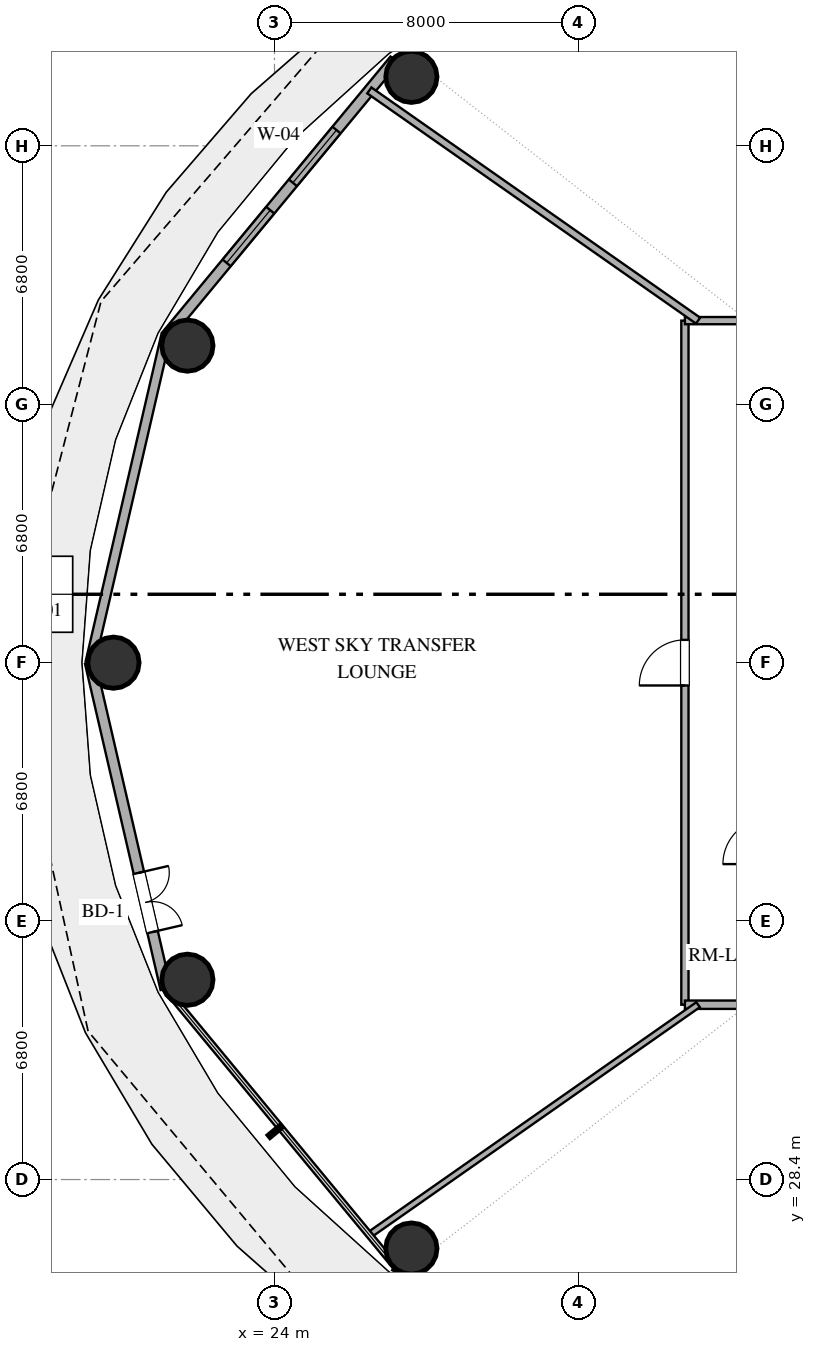
"""IFC4 building model, lengths in metres.
Left out: names, types, materials, properties, quantities, classifications, styles, units other than length and angle.
Written with IfcOpenShell. Run it as: python <this file> out.ifc"""

import sys

from ifc_helpers import new_model, si_unit, direction, frame, frame_2d, origin, origin_2d, place, context, subcontext, project, spatial, rectangle, hollow_circle, extrude, element, fill, save


model = new_model("IFC4")
c1 = context("Model", 3, precision=1e-05, world=origin(), true_north=direction((0.0, 1.0)))
c2 = subcontext(c1, "Body", "Model", "MODEL_VIEW")
j1 = project(units=[si_unit("LENGTHUNIT", "METRE"), si_unit("PLANEANGLEUNIT", "RADIAN")], contexts=[c1])
p1 = place(None, origin())
s1 = spatial("IfcSite", under=j1, at=p1, CompositionType="ELEMENT")
p2 = place(p1, origin())
s2 = spatial("IfcBuilding", under=s1, at=p2, CompositionType="ELEMENT")
p3 = place(p2, frame((0.0, 0.0, 134.4)))
s3 = spatial("IfcBuildingStorey", under=s2, at=p3, CompositionType="ELEMENT", Elevation=134.4)
for number, where, z_axis, x_axis in (
    (1, (27.602, 57.415, 0.0), (0.0, 0.0, 1.0), (1.0, 0.0, 0.0)),
    (2, (21.709, 50.343, 0.0), (0.0, 0.0, 1.0), (1.0, 0.0, 0.0)),
    (3, (19.763, 42.0, 0.0), (0.0, 0.0, 1.0), (1.0, 0.0, 0.0)),
    (4, (21.709, 33.657, 0.0), (0.0, 0.0, 1.0), (1.0, 0.0, 0.0)),
    (5, (27.602, 26.585, 0.0), (0.0, 0.0, 1.0), (1.0, 0.0, 0.0)),
):
    element("IfcColumn", number, at=place(p3, frame(where, z_axis=z_axis, x_axis=x_axis)), inside=s3, PredefinedType="COLUMN", context=c2, shape_type="SweptSolid", body=[
        extrude(hollow_circle(Radius=0.675, WallThickness=0.036, at=origin_2d()), origin(), (0.0, 0.0, 1.0), 5.05),
    ])
p4 = place(p3, frame((27.16, 57.86, 0.0), z_axis=(0.0, 0.0, 1.0), x_axis=(-0.637505817448, -0.770445541696, 0.0)))
e6 = element("IfcWall", 6, at=p4, inside=s3, PredefinedType="SOLIDWALL", context=c2, shape_type="SweptSolid", body=[
    extrude(rectangle(XDim=9.445, YDim=0.28, at=frame_2d((4.723, 0.0))), origin(), (0.0, 0.0, 1.0), 5.05),
])
p5 = place(p4, frame((2.396, 0.0, 0.85)))
e7 = element("IfcOpeningElement", 7, at=p5, cuts=e6, PredefinedType="OPENING", context=c2, shape_type="SweptSolid", body=[
    extrude(rectangle(XDim=1.8, YDim=2.2, at=frame_2d((0.9, 1.1))), frame((0.0, 0.15, 0.0), z_axis=(0.0, -1.0, 0.0), x_axis=(1.0, 0.0, 0.0)), (0.0, 0.0, 1.0), 0.3),
])
p6 = place(p4, frame((5.132, 0.0, 0.85)))
e8 = element("IfcOpeningElement", 8, at=p6, cuts=e6, PredefinedType="OPENING", context=c2, shape_type="SweptSolid", body=[
    extrude(rectangle(XDim=1.8, YDim=2.2, at=frame_2d((0.9, 1.1))), frame((0.0, 0.15, 0.0), z_axis=(0.0, -1.0, 0.0), x_axis=(1.0, 0.0, 0.0)), (0.0, 0.0, 1.0), 0.3),
])
p7 = place(p3, frame((21.139, 50.583, 0.0), z_axis=(0.0, 0.0, 1.0), x_axis=(-0.22558597182, -0.974223264616, 0.0)))
e9 = element("IfcWall", 9, at=p7, inside=s3, PredefinedType="SOLIDWALL", context=c2, shape_type="SweptSolid", body=[
    extrude(rectangle(XDim=8.811, YDim=0.25, at=frame_2d((4.405, 0.0))), origin(), (0.0, 0.0, 1.0), 5.05),
])
p8 = place(p3, frame((19.151, 42.0, 0.0), z_axis=(0.0, 0.0, 1.0), x_axis=(0.22558597182, -0.974223264616, 0.0)))
e10 = element("IfcWall", 10, at=p8, inside=s3, PredefinedType="SOLIDWALL", context=c2, shape_type="SweptSolid", body=[
    extrude(rectangle(XDim=8.811, YDim=0.28, at=frame_2d((4.405, 0.0))), origin(), (0.0, 0.0, 1.0), 5.05),
])
p9 = place(p8, frame((5.675, 0.0, 0.0)))
e11 = element("IfcOpeningElement", 11, at=p9, cuts=e10, PredefinedType="OPENING", context=c2, shape_type="SweptSolid", body=[
    extrude(rectangle(XDim=1.6, YDim=2.25, at=frame_2d((0.8, 1.125))), frame((0.0, 0.15, 0.0), z_axis=(0.0, -1.0, 0.0), x_axis=(1.0, 0.0, 0.0)), (0.0, 0.0, 1.0), 0.3),
])
p10 = place(p3, frame((27.16, 26.14, 0.0), z_axis=(0.0, 0.0, 1.0), x_axis=(0.889959505023, -0.45603955905, 0.0)))
e12 = element("IfcWall", 12, at=p10, inside=s3, PredefinedType="SOLIDWALL", context=c2, shape_type="SweptSolid", body=[
    extrude(rectangle(XDim=10.662, YDim=0.28, at=frame_2d((5.331, 0.0))), origin(), (0.0, 0.0, 1.0), 5.05),
])
p11 = place(p10, frame((3.231, 0.0, 0.85)))
e13 = element("IfcOpeningElement", 13, at=p11, cuts=e12, PredefinedType="OPENING", context=c2, shape_type="SweptSolid", body=[
    extrude(rectangle(XDim=1.35, YDim=1.8, at=frame_2d((0.675, 0.9))), frame((0.0, 0.15, 0.0), z_axis=(0.0, -1.0, 0.0), x_axis=(1.0, 0.0, 0.0)), (0.0, 0.0, 1.0), 0.3),
])
p12 = place(p10, frame((6.221, 0.0, 0.85)))
e14 = element("IfcOpeningElement", 14, at=p12, cuts=e12, PredefinedType="OPENING", context=c2, shape_type="SweptSolid", body=[
    extrude(rectangle(XDim=1.35, YDim=1.8, at=frame_2d((0.675, 0.9))), frame((0.0, 0.15, 0.0), z_axis=(0.0, -1.0, 0.0), x_axis=(1.0, 0.0, 0.0)), (0.0, 0.0, 1.0), 0.3),
])
p13 = place(p3, frame((34.8, 33.0, 0.0), z_axis=(0.0, 0.0, 1.0), x_axis=(0.0, 1.0, 0.0)))
e15 = element("IfcWall", 15, at=p13, inside=s3, PredefinedType="PARTITIONING", context=c2, shape_type="SweptSolid", body=[
    extrude(rectangle(XDim=18.0, YDim=0.19, at=frame_2d((9.0, 0.0))), origin(), (0.0, 0.0, 1.0), 4.35),
])
p14 = place(p13, frame((8.4, 0.0, 0.0)))
e16 = element("IfcOpeningElement", 16, at=p14, cuts=e15, PredefinedType="OPENING", context=c2, shape_type="SweptSolid", body=[
    extrude(rectangle(XDim=1.2, YDim=2.25, at=frame_2d((0.6, 1.125))), frame((0.0, 0.105, 0.0), z_axis=(0.0, -1.0, 0.0), x_axis=(1.0, 0.0, 0.0)), (0.0, 0.0, 1.0), 0.21),
])
p15 = place(p3, frame((34.8, 51.0, 0.0), z_axis=(0.0, 0.0, 1.0), x_axis=(1.0, 0.0, 0.0)))
e17 = element("IfcWall", 17, at=p15, inside=s3, PredefinedType="PARTITIONING", context=c2, shape_type="SweptSolid", body=[
    extrude(rectangle(XDim=26.4, YDim=0.19, at=frame_2d((13.2, 0.0))), origin(), (0.0, 0.0, 1.0), 4.35),
])
p16 = place(p15, frame((7.452, 0.0, 0.0)))
e18 = element("IfcOpeningElement", 18, at=p16, cuts=e17, PredefinedType="OPENING", context=c2, shape_type="SweptSolid", body=[
    extrude(rectangle(XDim=1.2, YDim=2.25, at=frame_2d((0.6, 1.125))), frame((0.0, 0.105, 0.0), z_axis=(0.0, -1.0, 0.0), x_axis=(1.0, 0.0, 0.0)), (0.0, 0.0, 1.0), 0.21),
])
p17 = place(p15, frame((20.474, 0.0, 0.0)))
e19 = element("IfcOpeningElement", 19, at=p17, cuts=e17, PredefinedType="OPENING", context=c2, shape_type="SweptSolid", body=[
    extrude(rectangle(XDim=1.2, YDim=2.25, at=frame_2d((0.6, 1.125))), frame((0.0, 0.105, 0.0), z_axis=(0.0, -1.0, 0.0), x_axis=(1.0, 0.0, 0.0)), (0.0, 0.0, 1.0), 0.21),
])
p18 = place(p3, frame((61.2, 33.0, 0.0), z_axis=(0.0, 0.0, 1.0), x_axis=(-1.0, 0.0, 0.0)))
e20 = element("IfcWall", 20, at=p18, inside=s3, PredefinedType="SOLIDWALL", context=c2, shape_type="SweptSolid", body=[
    extrude(rectangle(XDim=26.4, YDim=0.22, at=frame_2d((13.2, 0.0))), origin(), (0.0, 0.0, 1.0), 4.35),
])
p19 = place(p18, frame((18.645, 0.0, 0.0)))
e21 = element("IfcOpeningElement", 21, at=p19, cuts=e20, PredefinedType="OPENING", context=c2, shape_type="SweptSolid", body=[
    extrude(rectangle(XDim=1.2, YDim=2.25, at=frame_2d((0.6, 1.125))), frame((0.0, 0.12, 0.0), z_axis=(0.0, -1.0, 0.0), x_axis=(1.0, 0.0, 0.0)), (0.0, 0.0, 1.0), 0.24),
])
p20 = place(p18, frame((5.622, 0.0, 0.0)))
e22 = element("IfcOpeningElement", 22, at=p20, cuts=e20, PredefinedType="OPENING", context=c2, shape_type="SweptSolid", body=[
    extrude(rectangle(XDim=1.2, YDim=2.25, at=frame_2d((0.6, 1.125))), frame((0.0, 0.12, 0.0), z_axis=(0.0, -1.0, 0.0), x_axis=(1.0, 0.0, 0.0)), (0.0, 0.0, 1.0), 0.24),
])
p21 = place(p3, frame((26.496, 26.942, 0.0), z_axis=(0.0, 0.0, 1.0), x_axis=(0.819150459782, 0.573578699255, 0.0)))
e23 = element("IfcWall", 23, at=p21, inside=s3, PredefinedType="PLUMBINGWALL", context=c2, shape_type="SweptSolid", body=[
    extrude(rectangle(XDim=10.561, YDim=0.16, at=frame_2d((5.281, 0.0))), origin(), (0.0, 0.0, 1.0), 4.35),
])
p22 = place(p3, frame((35.147, 51.0, 0.0), z_axis=(0.0, 0.0, 1.0), x_axis=(-0.819150459782, 0.573578699255, 0.0)))
e24 = element("IfcWall", 24, at=p22, inside=s3, PredefinedType="PARTITIONING", context=c2, shape_type="SweptSolid", body=[
    extrude(rectangle(XDim=10.561, YDim=0.19, at=frame_2d((5.281, 0.0))), origin(), (0.0, 0.0, 1.0), 4.35),
])
p23 = place(p5, origin())
e25 = element("IfcWindow", 25, at=p23, inside=s3, PartitioningType="SINGLE_PANEL", PredefinedType="WINDOW", context=c2, shape_type="SweptSolid", body=[
    extrude(rectangle(XDim=1.8, YDim=2.2, at=frame_2d((0.9, 1.1))), frame((0.0, 0.03, 0.0), z_axis=(0.0, -1.0, 0.0), x_axis=(1.0, 0.0, 0.0)), (0.0, 0.0, 1.0), 0.06),
])
fill(e7, e25)
p24 = place(p6, origin())
e26 = element("IfcWindow", 26, at=p24, inside=s3, PartitioningType="SINGLE_PANEL", PredefinedType="WINDOW", context=c2, shape_type="SweptSolid", body=[
    extrude(rectangle(XDim=1.8, YDim=2.2, at=frame_2d((0.9, 1.1))), frame((0.0, 0.03, 0.0), z_axis=(0.0, -1.0, 0.0), x_axis=(1.0, 0.0, 0.0)), (0.0, 0.0, 1.0), 0.06),
])
fill(e8, e26)
p25 = place(p9, origin())
e27 = element("IfcDoor", 27, at=p25, inside=s3, OperationType="DOUBLE_DOOR_SINGLE_SWING", PredefinedType="DOOR", context=c2, shape_type="SweptSolid", body=[
    extrude(rectangle(XDim=1.6, YDim=2.25, at=frame_2d((0.8, 1.125))), frame((0.0, 0.025, 0.0), z_axis=(0.0, -1.0, 0.0), x_axis=(1.0, 0.0, 0.0)), (0.0, 0.0, 1.0), 0.05),
])
fill(e11, e27)
p26 = place(p14, origin())
e28 = element("IfcDoor", 28, at=p26, inside=s3, OperationType="SINGLE_SWING_LEFT", PredefinedType="DOOR", context=c2, shape_type="SweptSolid", body=[
    extrude(rectangle(XDim=1.2, YDim=2.25, at=frame_2d((0.6, 1.125))), frame((0.0, 0.025, 0.0), z_axis=(0.0, -1.0, 0.0), x_axis=(1.0, 0.0, 0.0)), (0.0, 0.0, 1.0), 0.05),
])
fill(e16, e28)
save(model, sys.argv[1])
